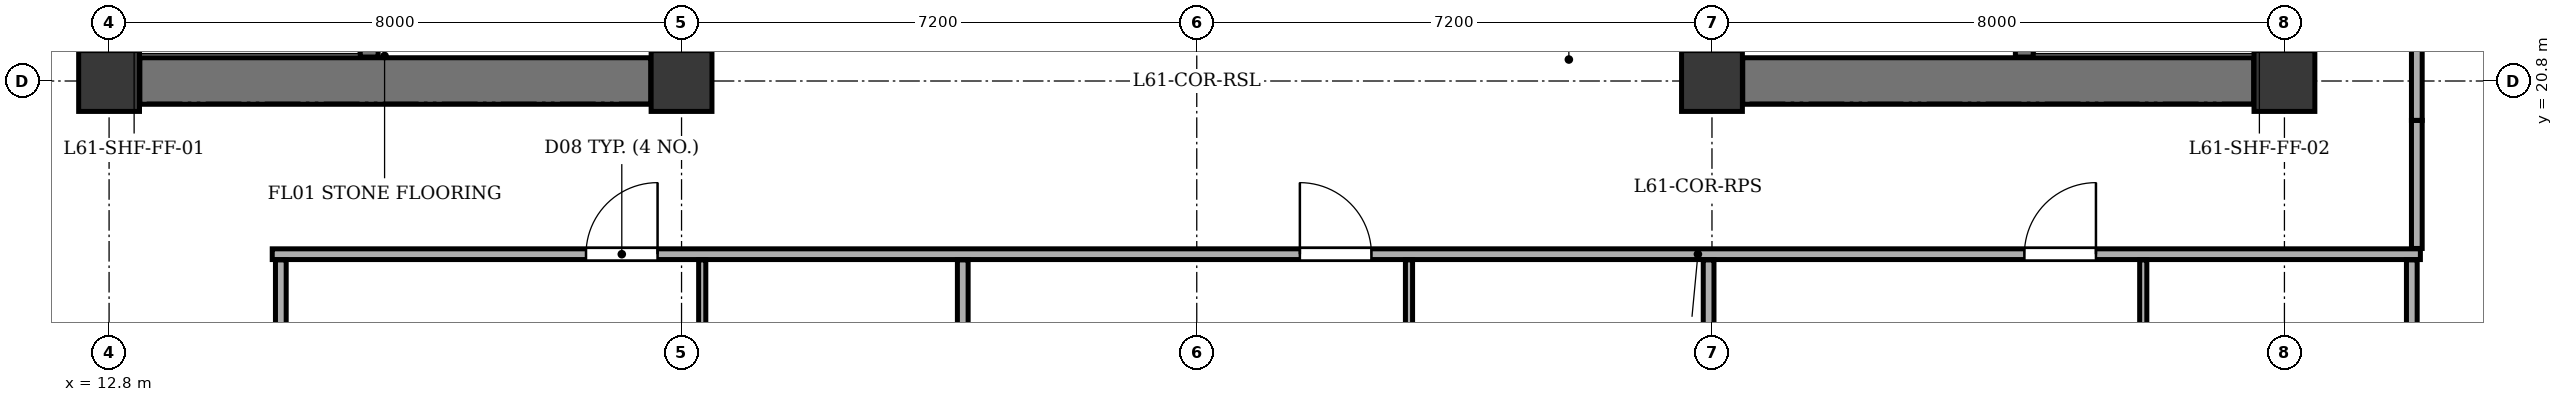
"""IFC4 building model, lengths in metres.
Left out: names, types, materials, properties, quantities, classifications, styles, units other than length and angle.
Written with IfcOpenShell. Run it as: python <this file> out.ifc"""

import sys

from ifc_helpers import new_model, si_unit, direction, frame, frame_2d, origin, origin_2d, place, context, subcontext, project, spatial, rectangle, extrude, element, fill, save


model = new_model("IFC4")
c1 = context("Model", 3, precision=1e-05, world=origin(), true_north=direction((0.0, 1.0)))
c2 = subcontext(c1, "Body", "Model", "MODEL_VIEW")
j1 = project(units=[si_unit("LENGTHUNIT", "METRE"), si_unit("PLANEANGLEUNIT", "RADIAN")], contexts=[c1])
p1 = place(None, origin())
s1 = spatial("IfcSite", under=j1, at=p1, CompositionType="ELEMENT")
p2 = place(p1, origin())
s2 = spatial("IfcBuilding", under=s1, at=p2, CompositionType="ELEMENT")
p3 = place(p2, frame((0.0, 0.0, 234.7)))
s3 = spatial("IfcBuildingStorey", under=s2, at=p3, CompositionType="ELEMENT", Elevation=234.7)
for number, where, z_axis, x_axis in (
    (1, (12.8, 20.8, 0.0), (0.0, 0.0, 1.0), (1.0, 0.0, 0.0)),
    (2, (20.8, 20.8, 0.0), (0.0, 0.0, 1.0), (1.0, 0.0, 0.0)),
    (3, (35.2, 20.8, 0.0), (0.0, 0.0, 1.0), (1.0, 0.0, 0.0)),
    (4, (43.2, 20.8, 0.0), (0.0, 0.0, 1.0), (1.0, 0.0, 0.0)),
):
    element("IfcColumn", number, at=place(p3, frame(where, z_axis=z_axis, x_axis=x_axis)), inside=s3, PredefinedType="COLUMN", context=c2, shape_type="SweptSolid", body=[
        extrude(rectangle(XDim=0.85, YDim=0.85, at=origin_2d()), origin(), (0.0, 0.0, 1.0), 3.4),
    ])
p4 = place(p3, frame((13.23, 20.8, 0.0), z_axis=(0.0, 0.0, 1.0), x_axis=(1.0, 0.0, 0.0)))
e5 = element("IfcWall", 5, at=p4, inside=s3, PredefinedType="SHEAR", context=c2, shape_type="SweptSolid", body=[
    extrude(rectangle(XDim=7.14, YDim=0.65, at=frame_2d((3.57, 0.0))), origin(), (0.0, 0.0, 1.0), 3.1),
])
p5 = place(p3, frame((16.435, 21.135, 0.0), z_axis=(0.0, 0.0, 1.0), x_axis=(0.0, 1.0, 0.0)))
e6 = element("IfcWall", 6, at=p5, inside=s3, PredefinedType="SHEAR", context=c2, shape_type="SweptSolid", body=[
    extrude(rectangle(XDim=12.13, YDim=0.25, at=frame_2d((6.065, 0.0))), origin(), (0.0, 0.0, 1.0), 3.1),
])
p6 = place(p5, frame((0.515, 0.0, 0.0)))
e7 = element("IfcOpeningElement", 7, at=p6, cuts=e6, PredefinedType="OPENING", context=c2, shape_type="SweptSolid", body=[
    extrude(rectangle(XDim=1.2, YDim=2.15, at=frame_2d((0.6, 1.075))), frame((0.0, 0.135, 0.0), z_axis=(0.0, -1.0, 0.0), x_axis=(1.0, 0.0, 0.0)), (0.0, 0.0, 1.0), 0.27),
])
p7 = place(p5, frame((2.665, 0.0, 0.0)))
e8 = element("IfcOpeningElement", 8, at=p7, cuts=e6, PredefinedType="OPENING", context=c2, shape_type="SweptSolid", body=[
    extrude(rectangle(XDim=1.15, YDim=2.15, at=frame_2d((0.575, 1.075))), frame((0.0, 0.135, 0.0), z_axis=(0.0, -1.0, 0.0), x_axis=(1.0, 0.0, 0.0)), (0.0, 0.0, 1.0), 0.27),
])
p8 = place(p3, frame((35.63, 20.8, 0.0), z_axis=(0.0, 0.0, 1.0), x_axis=(1.0, 0.0, 0.0)))
e9 = element("IfcWall", 9, at=p8, inside=s3, PredefinedType="SHEAR", context=c2, shape_type="SweptSolid", body=[
    extrude(rectangle(XDim=7.14, YDim=0.65, at=frame_2d((3.57, 0.0))), origin(), (0.0, 0.0, 1.0), 3.1),
])
p9 = place(p3, frame((39.565, 21.135, 0.0), z_axis=(0.0, 0.0, 1.0), x_axis=(0.0, 1.0, 0.0)))
e10 = element("IfcWall", 10, at=p9, inside=s3, PredefinedType="SHEAR", context=c2, shape_type="SweptSolid", body=[
    extrude(rectangle(XDim=12.13, YDim=0.25, at=frame_2d((6.065, 0.0))), origin(), (0.0, 0.0, 1.0), 3.1),
])
p10 = place(p9, frame((0.515, 0.0, 0.0)))
e11 = element("IfcOpeningElement", 11, at=p10, cuts=e10, PredefinedType="OPENING", context=c2, shape_type="SweptSolid", body=[
    extrude(rectangle(XDim=1.2, YDim=2.15, at=frame_2d((0.6, 1.075))), frame((0.0, 0.135, 0.0), z_axis=(0.0, -1.0, 0.0), x_axis=(1.0, 0.0, 0.0)), (0.0, 0.0, 1.0), 0.27),
])
p11 = place(p9, frame((2.665, 0.0, 0.0)))
e12 = element("IfcOpeningElement", 12, at=p11, cuts=e10, PredefinedType="OPENING", context=c2, shape_type="SweptSolid", body=[
    extrude(rectangle(XDim=1.15, YDim=2.15, at=frame_2d((0.575, 1.075))), frame((0.0, 0.135, 0.0), z_axis=(0.0, -1.0, 0.0), x_axis=(1.0, 0.0, 0.0)), (0.0, 0.0, 1.0), 0.27),
])
p12 = place(p3, frame((15.08, 18.38, 0.0), z_axis=(0.0, 0.0, 1.0), x_axis=(1.0, 0.0, 0.0)))
e13 = element("IfcWall", 13, at=p12, inside=s3, PredefinedType="PARTITIONING", context=c2, shape_type="SweptSolid", body=[
    extrude(rectangle(XDim=30.02, YDim=0.15, at=frame_2d((15.01, 0.0))), origin(), (0.0, 0.0, 1.0), 3.1),
])
p13 = place(p12, frame((4.385, 0.0, 0.0)))
e14 = element("IfcOpeningElement", 14, at=p13, cuts=e13, PredefinedType="OPENING", context=c2, shape_type="SweptSolid", body=[
    extrude(rectangle(XDim=1.0, YDim=2.1, at=frame_2d((0.5, 1.05))), frame((0.0, 0.085, 0.0), z_axis=(0.0, -1.0, 0.0), x_axis=(1.0, 0.0, 0.0)), (0.0, 0.0, 1.0), 0.17),
])
p14 = place(p12, frame((14.361, 0.0, 0.0)))
e15 = element("IfcOpeningElement", 15, at=p14, cuts=e13, PredefinedType="OPENING", context=c2, shape_type="SweptSolid", body=[
    extrude(rectangle(XDim=1.0, YDim=2.1, at=frame_2d((0.5, 1.05))), frame((0.0, 0.085, 0.0), z_axis=(0.0, -1.0, 0.0), x_axis=(1.0, 0.0, 0.0)), (0.0, 0.0, 1.0), 0.17),
])
p15 = place(p12, frame((24.486, 0.0, 0.0)))
e16 = element("IfcOpeningElement", 16, at=p15, cuts=e13, PredefinedType="OPENING", context=c2, shape_type="SweptSolid", body=[
    extrude(rectangle(XDim=1.0, YDim=2.1, at=frame_2d((0.5, 1.05))), frame((0.0, 0.085, 0.0), z_axis=(0.0, -1.0, 0.0), x_axis=(1.0, 0.0, 0.0)), (0.0, 0.0, 1.0), 0.17),
])
p16 = place(p3, frame((15.2, 3.045, 0.0), z_axis=(0.0, 0.0, 1.0), x_axis=(0.0, 1.0, 0.0)))
e17 = element("IfcWall", 17, at=p16, inside=s3, PredefinedType="PARTITIONING", context=c2, shape_type="SweptSolid", body=[
    extrude(rectangle(XDim=15.255, YDim=0.15, at=frame_2d((7.627, 0.0))), origin(), (0.0, 0.0, 1.0), 3.1),
])
p17 = place(p3, frame((21.089, 5.605, 0.0), z_axis=(0.0, 0.0, 1.0), x_axis=(0.0, 1.0, 0.0)))
e18 = element("IfcWall", 18, at=p17, inside=s3, PredefinedType="PARTITIONING", context=c2, shape_type="SweptSolid", body=[
    extrude(rectangle(XDim=12.695, YDim=0.1, at=frame_2d((6.348, 0.0))), origin(), (0.0, 0.0, 1.0), 2.535),
])
p18 = place(p17, frame((0.605, 0.0, 0.0)))
e19 = element("IfcOpeningElement", 19, at=p18, cuts=e18, PredefinedType="OPENING", context=c2, shape_type="SweptSolid", body=[
    extrude(rectangle(XDim=0.9, YDim=2.05, at=frame_2d((0.45, 1.025))), frame((0.0, 0.06, 0.0), z_axis=(0.0, -1.0, 0.0), x_axis=(1.0, 0.0, 0.0)), (0.0, 0.0, 1.0), 0.12),
])
p19 = place(p3, frame((24.73, 3.045, 0.0), z_axis=(0.0, 0.0, 1.0), x_axis=(0.0, 1.0, 0.0)))
e20 = element("IfcWall", 20, at=p19, inside=s3, PredefinedType="PARTITIONING", context=c2, shape_type="SweptSolid", body=[
    extrude(rectangle(XDim=15.255, YDim=0.15, at=frame_2d((7.627, 0.0))), origin(), (0.0, 0.0, 1.0), 3.1),
])
p20 = place(p3, frame((30.966, 5.605, 0.0), z_axis=(0.0, 0.0, 1.0), x_axis=(0.0, 1.0, 0.0)))
e21 = element("IfcWall", 21, at=p20, inside=s3, PredefinedType="PARTITIONING", context=c2, shape_type="SweptSolid", body=[
    extrude(rectangle(XDim=12.695, YDim=0.1, at=frame_2d((6.348, 0.0))), origin(), (0.0, 0.0, 1.0), 3.1),
])
p21 = place(p20, frame((0.605, 0.0, 0.0)))
e22 = element("IfcOpeningElement", 22, at=p21, cuts=e21, PredefinedType="OPENING", context=c2, shape_type="SweptSolid", body=[
    extrude(rectangle(XDim=0.9, YDim=2.05, at=frame_2d((0.45, 1.025))), frame((0.0, 0.06, 0.0), z_axis=(0.0, -1.0, 0.0), x_axis=(1.0, 0.0, 0.0)), (0.0, 0.0, 1.0), 0.12),
])
p22 = place(p3, frame((35.153, 3.045, 0.0), z_axis=(0.0, 0.0, 1.0), x_axis=(0.0, 1.0, 0.0)))
e23 = element("IfcWall", 23, at=p22, inside=s3, PredefinedType="PARTITIONING", context=c2, shape_type="SweptSolid", body=[
    extrude(rectangle(XDim=15.255, YDim=0.15, at=frame_2d((7.627, 0.0))), origin(), (0.0, 0.0, 1.0), 2.535),
])
p23 = place(p3, frame((41.227, 5.605, 0.0), z_axis=(0.0, 0.0, 1.0), x_axis=(0.0, 1.0, 0.0)))
e24 = element("IfcWall", 24, at=p23, inside=s3, PredefinedType="PARTITIONING", context=c2, shape_type="SweptSolid", body=[
    extrude(rectangle(XDim=12.695, YDim=0.1, at=frame_2d((6.348, 0.0))), origin(), (0.0, 0.0, 1.0), 3.1),
])
p24 = place(p23, frame((0.605, 0.0, 0.0)))
e25 = element("IfcOpeningElement", 25, at=p24, cuts=e24, PredefinedType="OPENING", context=c2, shape_type="SweptSolid", body=[
    extrude(rectangle(XDim=0.9, YDim=2.05, at=frame_2d((0.45, 1.025))), frame((0.0, 0.06, 0.0), z_axis=(0.0, -1.0, 0.0), x_axis=(1.0, 0.0, 0.0)), (0.0, 0.0, 1.0), 0.12),
])
p25 = place(p3, frame((44.98, 3.045, 0.0), z_axis=(0.0, 0.0, 1.0), x_axis=(0.0, 1.0, 0.0)))
e26 = element("IfcWall", 26, at=p25, inside=s3, PredefinedType="PARTITIONING", context=c2, shape_type="SweptSolid", body=[
    extrude(rectangle(XDim=15.255, YDim=0.15, at=frame_2d((7.627, 0.0))), origin(), (0.0, 0.0, 1.0), 2.725),
])
p26 = place(p3, frame((45.05, 18.46, 0.0), z_axis=(0.0, 0.0, 1.0), x_axis=(0.0, 1.0, 0.0)))
e27 = element("IfcWall", 27, at=p26, inside=s3, PredefinedType="PARTITIONING", context=c2, shape_type="SweptSolid", body=[
    extrude(rectangle(XDim=1.79, YDim=0.15, at=frame_2d((0.895, 0.0))), origin(), (0.0, 0.0, 1.0), 2.725),
])
p27 = place(p3, frame((45.05, 20.25, 0.0), z_axis=(0.0, 0.0, 1.0), x_axis=(0.0, 1.0, 0.0)))
e28 = element("IfcWall", 28, at=p27, inside=s3, PredefinedType="PARTITIONING", context=c2, shape_type="SweptSolid", body=[
    extrude(rectangle(XDim=13.9, YDim=0.15, at=frame_2d((6.95, 0.0))), origin(), (0.0, 0.0, 1.0), 2.725),
])
p28 = place(p13, origin())
e29 = element("IfcDoor", 29, at=p28, inside=s3, OperationType="SINGLE_SWING_RIGHT", PredefinedType="DOOR", context=c2, shape_type="SweptSolid", body=[
    extrude(rectangle(XDim=1.0, YDim=2.1, at=frame_2d((0.5, 1.05))), frame((0.0, 0.025, 0.0), z_axis=(0.0, -1.0, 0.0), x_axis=(1.0, 0.0, 0.0)), (0.0, 0.0, 1.0), 0.05),
])
fill(e14, e29)
p29 = place(p14, origin())
e30 = element("IfcDoor", 30, at=p29, inside=s3, OperationType="SINGLE_SWING_LEFT", PredefinedType="DOOR", context=c2, shape_type="SweptSolid", body=[
    extrude(rectangle(XDim=1.0, YDim=2.1, at=frame_2d((0.5, 1.05))), frame((0.0, 0.025, 0.0), z_axis=(0.0, -1.0, 0.0), x_axis=(1.0, 0.0, 0.0)), (0.0, 0.0, 1.0), 0.05),
])
fill(e15, e30)
p30 = place(p15, origin())
e31 = element("IfcDoor", 31, at=p30, inside=s3, OperationType="SINGLE_SWING_RIGHT", PredefinedType="DOOR", context=c2, shape_type="SweptSolid", body=[
    extrude(rectangle(XDim=1.0, YDim=2.1, at=frame_2d((0.5, 1.05))), frame((0.0, 0.025, 0.0), z_axis=(0.0, -1.0, 0.0), x_axis=(1.0, 0.0, 0.0)), (0.0, 0.0, 1.0), 0.05),
])
fill(e16, e31)
save(model, sys.argv[1])
